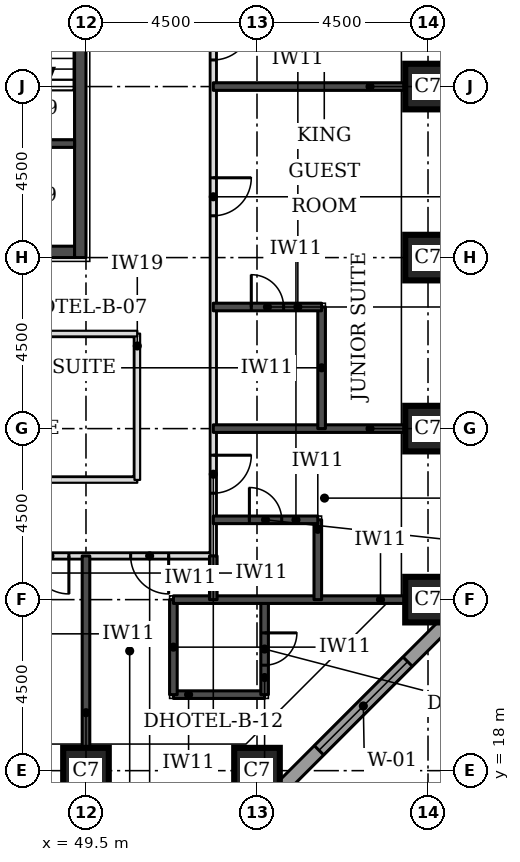
"""IFC4 building model, lengths in metres.
Left out: names, types, materials, properties, quantities, classifications, styles, units other than length and angle.
Written with IfcOpenShell. Run it as: python <this file> out.ifc"""

import sys

from ifc_helpers import new_model, si_unit, direction, frame, frame_2d, origin, origin_2d, place, context, subcontext, project, spatial, rectangle, extrude, element, fill, save


model = new_model("IFC4")
c1 = context("Model", 3, precision=1e-05, world=origin(), true_north=direction((0.0, 1.0)))
c2 = subcontext(c1, "Body", "Model", "MODEL_VIEW")
j1 = project(units=[si_unit("LENGTHUNIT", "METRE"), si_unit("PLANEANGLEUNIT", "RADIAN")], contexts=[c1])
p1 = place(None, origin())
s1 = spatial("IfcSite", under=j1, at=p1, CompositionType="ELEMENT")
p2 = place(p1, origin())
s2 = spatial("IfcBuilding", under=s1, at=p2, CompositionType="ELEMENT")
p3 = place(p2, frame((0.0, 0.0, 52.8)))
s3 = spatial("IfcBuildingStorey", under=s2, at=p3, CompositionType="ELEMENT", Elevation=52.8)
for number, where, z_axis, x_axis in (
    (1, (49.5, 18.0, 0.0), (0.0, 0.0, 1.0), (1.0, 0.0, 0.0)),
    (2, (54.0, 18.0, 0.0), (0.0, 0.0, 1.0), (1.0, 0.0, 0.0)),
    (3, (58.5, 22.5, 0.0), (0.0, 0.0, 1.0), (1.0, 0.0, 0.0)),
    (4, (58.5, 27.0, 0.0), (0.0, 0.0, 1.0), (1.0, 0.0, 0.0)),
    (5, (58.5, 31.5, 0.0), (0.0, 0.0, 1.0), (1.0, 0.0, 0.0)),
    (6, (58.5, 36.0, 0.0), (0.0, 0.0, 1.0), (1.0, 0.0, 0.0)),
):
    element("IfcColumn", number, at=place(p3, frame(where, z_axis=z_axis, x_axis=x_axis)), inside=s3, PredefinedType="COLUMN", context=c2, shape_type="SweptSolid", body=[
        extrude(rectangle(XDim=1.2, YDim=1.2, at=origin_2d()), origin(), (0.0, 0.0, 1.0), 3.3),
    ])
p4 = place(p3, frame((40.8, 31.65, 0.0), z_axis=(0.0, 0.0, 1.0), x_axis=(1.0, 0.0, 0.0)))
e7 = element("IfcWall", 7, at=p4, inside=s3, PredefinedType="SHEAR", context=c2, shape_type="SweptSolid", body=[
    extrude(rectangle(XDim=8.4, YDim=0.3, at=frame_2d((4.2, 0.0))), origin(), (0.0, 0.0, 1.0), 3.3),
])
p5 = place(p4, frame((5.2, 0.0, 0.0)))
e8 = element("IfcOpeningElement", 8, at=p5, cuts=e7, PredefinedType="OPENING", context=c2, shape_type="SweptSolid", body=[
    extrude(rectangle(XDim=1.0, YDim=2.1, at=frame_2d((0.5, 1.05))), frame((0.0, 0.16, 0.0), z_axis=(0.0, -1.0, 0.0), x_axis=(1.0, 0.0, 0.0)), (0.0, 0.0, 1.0), 0.32),
])
p6 = place(p3, frame((49.35, 31.5, 0.0), z_axis=(0.0, 0.0, 1.0), x_axis=(0.0, 1.0, 0.0)))
e9 = element("IfcWall", 9, at=p6, inside=s3, PredefinedType="SHEAR", context=c2, shape_type="SweptSolid", body=[
    extrude(rectangle(XDim=9.0, YDim=0.3, at=frame_2d((4.5, 0.0))), origin(), (0.0, 0.0, 1.0), 3.3),
])
p7 = place(p3, frame((54.27, 17.174, 0.0), z_axis=(0.0, 0.0, 1.0), x_axis=(0.707106781187, 0.707106781187, 0.0)))
e10 = element("IfcWall", 10, at=p7, inside=s3, PredefinedType="STANDARD", context=c2, shape_type="SweptSolid", body=[
    extrude(rectangle(XDim=7.151, YDim=0.35, at=frame_2d((3.576, 0.0))), origin(), (0.0, 0.0, 1.0), 3.055),
])
p8 = place(p7, frame((1.926, 0.0, 0.8)))
e11 = element("IfcOpeningElement", 11, at=p8, cuts=e10, PredefinedType="OPENING", context=c2, shape_type="SweptSolid", body=[
    extrude(rectangle(XDim=3.3, YDim=1.5, at=frame_2d((1.65, 0.75))), frame((0.0, 0.185, 0.0), z_axis=(0.0, -1.0, 0.0), x_axis=(1.0, 0.0, 0.0)), (0.0, 0.0, 1.0), 0.37),
])
p9 = place(p3, frame((20.65, 23.65, 0.0), z_axis=(0.0, 0.0, 1.0), x_axis=(1.0, 0.0, 0.0)))
e12 = element("IfcWall", 12, at=p9, inside=s3, PredefinedType="PARTITIONING", context=c2, shape_type="SweptSolid", body=[
    extrude(rectangle(XDim=32.2, YDim=0.15, at=frame_2d((16.1, 0.0))), origin(), (0.0, 0.0, 1.0), 3.08),
])
p10 = place(p9, frame((2.55, 0.0, 0.0)))
e13 = element("IfcOpeningElement", 13, at=p10, cuts=e12, PredefinedType="OPENING", context=c2, shape_type="SweptSolid", body=[
    extrude(rectangle(XDim=1.0, YDim=2.1, at=frame_2d((0.5, 1.05))), frame((0.0, 0.085, 0.0), z_axis=(0.0, -1.0, 0.0), x_axis=(1.0, 0.0, 0.0)), (0.0, 0.0, 1.0), 0.17),
])
p11 = place(p9, frame((9.4, 0.0, 0.0)))
e14 = element("IfcOpeningElement", 14, at=p11, cuts=e12, PredefinedType="OPENING", context=c2, shape_type="SweptSolid", body=[
    extrude(rectangle(XDim=1.0, YDim=2.1, at=frame_2d((0.5, 1.05))), frame((0.0, 0.085, 0.0), z_axis=(0.0, -1.0, 0.0), x_axis=(1.0, 0.0, 0.0)), (0.0, 0.0, 1.0), 0.17),
])
p12 = place(p9, frame((11.55, 0.0, 0.0)))
e15 = element("IfcOpeningElement", 15, at=p12, cuts=e12, PredefinedType="OPENING", context=c2, shape_type="SweptSolid", body=[
    extrude(rectangle(XDim=1.0, YDim=2.1, at=frame_2d((0.5, 1.05))), frame((0.0, 0.085, 0.0), z_axis=(0.0, -1.0, 0.0), x_axis=(1.0, 0.0, 0.0)), (0.0, 0.0, 1.0), 0.17),
])
p13 = place(p9, frame((18.4, 0.0, 0.0)))
e16 = element("IfcOpeningElement", 16, at=p13, cuts=e12, PredefinedType="OPENING", context=c2, shape_type="SweptSolid", body=[
    extrude(rectangle(XDim=1.0, YDim=2.1, at=frame_2d((0.5, 1.05))), frame((0.0, 0.085, 0.0), z_axis=(0.0, -1.0, 0.0), x_axis=(1.0, 0.0, 0.0)), (0.0, 0.0, 1.0), 0.17),
])
p14 = place(p9, frame((20.55, 0.0, 0.0)))
e17 = element("IfcOpeningElement", 17, at=p14, cuts=e12, PredefinedType="OPENING", context=c2, shape_type="SweptSolid", body=[
    extrude(rectangle(XDim=1.0, YDim=2.1, at=frame_2d((0.5, 1.05))), frame((0.0, 0.085, 0.0), z_axis=(0.0, -1.0, 0.0), x_axis=(1.0, 0.0, 0.0)), (0.0, 0.0, 1.0), 0.17),
])
p15 = place(p9, frame((27.4, 0.0, 0.0)))
e18 = element("IfcOpeningElement", 18, at=p15, cuts=e12, PredefinedType="OPENING", context=c2, shape_type="SweptSolid", body=[
    extrude(rectangle(XDim=1.0, YDim=2.1, at=frame_2d((0.5, 1.05))), frame((0.0, 0.085, 0.0), z_axis=(0.0, -1.0, 0.0), x_axis=(1.0, 0.0, 0.0)), (0.0, 0.0, 1.0), 0.17),
])
p16 = place(p9, frame((0.425, 0.0, 0.0)))
e19 = element("IfcOpeningElement", 19, at=p16, cuts=e12, PredefinedType="OPENING", context=c2, shape_type="SweptSolid", body=[
    extrude(rectangle(XDim=1.0, YDim=2.1, at=frame_2d((0.5, 1.05))), frame((0.0, 0.085, 0.0), z_axis=(0.0, -1.0, 0.0), x_axis=(1.0, 0.0, 0.0)), (0.0, 0.0, 1.0), 0.17),
])
p17 = place(p9, frame((30.025, 0.0, 0.0)))
e20 = element("IfcOpeningElement", 20, at=p17, cuts=e12, PredefinedType="OPENING", context=c2, shape_type="SweptSolid", body=[
    extrude(rectangle(XDim=1.0, YDim=2.1, at=frame_2d((0.5, 1.05))), frame((0.0, 0.085, 0.0), z_axis=(0.0, -1.0, 0.0), x_axis=(1.0, 0.0, 0.0)), (0.0, 0.0, 1.0), 0.17),
])
p18 = place(p3, frame((52.85, 23.65, 0.0), z_axis=(0.0, 0.0, 1.0), x_axis=(0.0, 1.0, 0.0)))
e21 = element("IfcWall", 21, at=p18, inside=s3, PredefinedType="PARTITIONING", context=c2, shape_type="SweptSolid", body=[
    extrude(rectangle(XDim=23.85, YDim=0.15, at=frame_2d((11.925, 0.0))), origin(), (0.0, 0.0, 1.0), 3.08),
])
p19 = place(p18, frame((1.65, 0.0, 0.0)))
e22 = element("IfcOpeningElement", 22, at=p19, cuts=e21, PredefinedType="OPENING", context=c2, shape_type="SweptSolid", body=[
    extrude(rectangle(XDim=1.0, YDim=2.1, at=frame_2d((0.5, 1.05))), frame((0.0, 0.085, 0.0), z_axis=(0.0, -1.0, 0.0), x_axis=(1.0, 0.0, 0.0)), (0.0, 0.0, 1.0), 0.17),
])
p20 = place(p18, frame((8.95, 0.0, 0.0)))
e23 = element("IfcOpeningElement", 23, at=p20, cuts=e21, PredefinedType="OPENING", context=c2, shape_type="SweptSolid", body=[
    extrude(rectangle(XDim=1.0, YDim=2.1, at=frame_2d((0.5, 1.05))), frame((0.0, 0.085, 0.0), z_axis=(0.0, -1.0, 0.0), x_axis=(1.0, 0.0, 0.0)), (0.0, 0.0, 1.0), 0.17),
])
p21 = place(p18, frame((13.05, 0.0, 0.0)))
e24 = element("IfcOpeningElement", 24, at=p21, cuts=e21, PredefinedType="OPENING", context=c2, shape_type="SweptSolid", body=[
    extrude(rectangle(XDim=1.0, YDim=2.1, at=frame_2d((0.5, 1.05))), frame((0.0, 0.085, 0.0), z_axis=(0.0, -1.0, 0.0), x_axis=(1.0, 0.0, 0.0)), (0.0, 0.0, 1.0), 0.17),
])
p22 = place(p18, frame((19.9, 0.0, 0.0)))
e25 = element("IfcOpeningElement", 25, at=p22, cuts=e21, PredefinedType="OPENING", context=c2, shape_type="SweptSolid", body=[
    extrude(rectangle(XDim=0.9, YDim=2.1, at=frame_2d((0.45, 1.05))), frame((0.0, 0.085, 0.0), z_axis=(0.0, -1.0, 0.0), x_axis=(1.0, 0.0, 0.0)), (0.0, 0.0, 1.0), 0.17),
])
p23 = place(p3, frame((40.5, 25.65, 0.0), z_axis=(0.0, 0.0, 1.0), x_axis=(1.0, 0.0, 0.0)))
e26 = element("IfcWall", 26, at=p23, inside=s3, PredefinedType="PARTITIONING", context=c2, shape_type="SweptSolid", body=[
    extrude(rectangle(XDim=10.35, YDim=0.15, at=frame_2d((5.175, 0.0))), origin(), (0.0, 0.0, 1.0), 3.08),
])
p24 = place(p3, frame((50.85, 25.65, 0.0), z_axis=(0.0, 0.0, 1.0), x_axis=(0.0, 1.0, 0.0)))
e27 = element("IfcWall", 27, at=p24, inside=s3, PredefinedType="PARTITIONING", context=c2, shape_type="SweptSolid", body=[
    extrude(rectangle(XDim=3.85, YDim=0.15, at=frame_2d((1.925, 0.0))), origin(), (0.0, 0.0, 1.0), 3.08),
])
p25 = place(p3, frame((40.5, 29.5, 0.0), z_axis=(0.0, 0.0, 1.0), x_axis=(1.0, 0.0, 0.0)))
e28 = element("IfcWall", 28, at=p25, inside=s3, PredefinedType="PARTITIONING", context=c2, shape_type="SweptSolid", body=[
    extrude(rectangle(XDim=10.35, YDim=0.15, at=frame_2d((5.175, 0.0))), origin(), (0.0, 0.0, 1.0), 3.08),
])
p26 = place(p25, frame((4.725, 0.0, 0.0)))
e29 = element("IfcOpeningElement", 29, at=p26, cuts=e28, PredefinedType="OPENING", context=c2, shape_type="SweptSolid", body=[
    extrude(rectangle(XDim=0.9, YDim=2.1, at=frame_2d((0.45, 1.05))), frame((0.0, 0.085, 0.0), z_axis=(0.0, -1.0, 0.0), x_axis=(1.0, 0.0, 0.0)), (0.0, 0.0, 1.0), 0.17),
])
p27 = place(p3, frame((49.5, 18.6, 0.0), z_axis=(0.0, 0.0, 1.0), x_axis=(0.0, 1.0, 0.0)))
e30 = element("IfcWall", 30, at=p27, inside=s3, PredefinedType="SOLIDWALL", context=c2, shape_type="SweptSolid", body=[
    extrude(rectangle(XDim=5.05, YDim=0.2, at=frame_2d((2.525, 0.0))), origin(), (0.0, 0.0, 1.0), 3.08),
])
p28 = place(p3, frame((51.8, 20.0, 0.0), z_axis=(0.0, 0.0, 1.0), x_axis=(1.0, 0.0, 0.0)))
e31 = element("IfcWall", 31, at=p28, inside=s3, PredefinedType="SOLIDWALL", context=c2, shape_type="SweptSolid", body=[
    extrude(rectangle(XDim=2.4, YDim=0.2, at=frame_2d((1.2, 0.0))), origin(), (0.0, 0.0, 1.0), 3.08),
])
p29 = place(p3, frame((51.8, 20.0, 0.0), z_axis=(0.0, 0.0, 1.0), x_axis=(0.0, 1.0, 0.0)))
e32 = element("IfcWall", 32, at=p29, inside=s3, PredefinedType="SOLIDWALL", context=c2, shape_type="SweptSolid", body=[
    extrude(rectangle(XDim=2.5, YDim=0.2, at=frame_2d((1.25, 0.0))), origin(), (0.0, 0.0, 1.0), 3.08),
])
p30 = place(p3, frame((54.2, 20.0, 0.0), z_axis=(0.0, 0.0, 1.0), x_axis=(0.0, 1.0, 0.0)))
e33 = element("IfcWall", 33, at=p30, inside=s3, PredefinedType="SOLIDWALL", context=c2, shape_type="SweptSolid", body=[
    extrude(rectangle(XDim=2.5, YDim=0.2, at=frame_2d((1.25, 0.0))), origin(), (0.0, 0.0, 1.0), 3.08),
])
p31 = place(p30, frame((0.775, 0.0, 0.0)))
e34 = element("IfcOpeningElement", 34, at=p31, cuts=e33, PredefinedType="OPENING", context=c2, shape_type="SweptSolid", body=[
    extrude(rectangle(XDim=0.85, YDim=2.1, at=frame_2d((0.425, 1.05))), frame((0.0, 0.11, 0.0), z_axis=(0.0, -1.0, 0.0), x_axis=(1.0, 0.0, 0.0)), (0.0, 0.0, 1.0), 0.22),
])
p32 = place(p3, frame((51.8, 22.5, 0.0), z_axis=(0.0, 0.0, 1.0), x_axis=(1.0, 0.0, 0.0)))
e35 = element("IfcWall", 35, at=p32, inside=s3, PredefinedType="SOLIDWALL", context=c2, shape_type="SweptSolid", body=[
    extrude(rectangle(XDim=6.1, YDim=0.2, at=frame_2d((3.05, 0.0))), origin(), (0.0, 0.0, 1.0), 3.08),
])
p33 = place(p3, frame((52.85, 22.5, 0.0), z_axis=(0.0, 0.0, 1.0), x_axis=(0.0, 1.0, 0.0)))
e36 = element("IfcWall", 36, at=p33, inside=s3, PredefinedType="SOLIDWALL", context=c2, shape_type="SweptSolid", body=[
    extrude(rectangle(XDim=1.15, YDim=0.2, at=frame_2d((0.575, 0.0))), origin(), (0.0, 0.0, 1.0), 3.08),
])
p34 = place(p3, frame((55.6, 22.5, 0.0), z_axis=(0.0, 0.0, 1.0), x_axis=(0.0, 1.0, 0.0)))
e37 = element("IfcWall", 37, at=p34, inside=s3, PredefinedType="SOLIDWALL", context=c2, shape_type="SweptSolid", body=[
    extrude(rectangle(XDim=2.1, YDim=0.2, at=frame_2d((1.05, 0.0))), origin(), (0.0, 0.0, 1.0), 3.08),
])
p35 = place(p3, frame((52.85, 24.6, 0.0), z_axis=(0.0, 0.0, 1.0), x_axis=(1.0, 0.0, 0.0)))
e38 = element("IfcWall", 38, at=p35, inside=s3, PredefinedType="SOLIDWALL", context=c2, shape_type="SweptSolid", body=[
    extrude(rectangle(XDim=2.75, YDim=0.2, at=frame_2d((1.375, 0.0))), origin(), (0.0, 0.0, 1.0), 3.08),
])
p36 = place(p35, frame((0.95, 0.0, 0.0)))
e39 = element("IfcOpeningElement", 39, at=p36, cuts=e38, PredefinedType="OPENING", context=c2, shape_type="SweptSolid", body=[
    extrude(rectangle(XDim=0.85, YDim=2.1, at=frame_2d((0.425, 1.05))), frame((0.0, 0.11, 0.0), z_axis=(0.0, -1.0, 0.0), x_axis=(1.0, 0.0, 0.0)), (0.0, 0.0, 1.0), 0.22),
])
p37 = place(p3, frame((52.85, 27.0, 0.0), z_axis=(0.0, 0.0, 1.0), x_axis=(1.0, 0.0, 0.0)))
e40 = element("IfcWall", 40, at=p37, inside=s3, PredefinedType="SOLIDWALL", context=c2, shape_type="SweptSolid", body=[
    extrude(rectangle(XDim=5.05, YDim=0.2, at=frame_2d((2.525, 0.0))), origin(), (0.0, 0.0, 1.0), 3.08),
])
p38 = place(p3, frame((55.7, 27.0, 0.0), z_axis=(0.0, 0.0, 1.0), x_axis=(0.0, 1.0, 0.0)))
e41 = element("IfcWall", 41, at=p38, inside=s3, PredefinedType="SOLIDWALL", context=c2, shape_type="SweptSolid", body=[
    extrude(rectangle(XDim=3.2, YDim=0.2, at=frame_2d((1.6, 0.0))), origin(), (0.0, 0.0, 1.0), 3.08),
])
p39 = place(p3, frame((52.85, 30.2, 0.0), z_axis=(0.0, 0.0, 1.0), x_axis=(1.0, 0.0, 0.0)))
e42 = element("IfcWall", 42, at=p39, inside=s3, PredefinedType="SOLIDWALL", context=c2, shape_type="SweptSolid", body=[
    extrude(rectangle(XDim=2.85, YDim=0.2, at=frame_2d((1.425, 0.0))), origin(), (0.0, 0.0, 1.0), 3.08),
])
p40 = place(p39, frame((1.0, 0.0, 0.0)))
e43 = element("IfcOpeningElement", 43, at=p40, cuts=e42, PredefinedType="OPENING", context=c2, shape_type="SweptSolid", body=[
    extrude(rectangle(XDim=0.85, YDim=2.1, at=frame_2d((0.425, 1.05))), frame((0.0, 0.11, 0.0), z_axis=(0.0, -1.0, 0.0), x_axis=(1.0, 0.0, 0.0)), (0.0, 0.0, 1.0), 0.22),
])
p41 = place(p3, frame((52.85, 36.0, 0.0), z_axis=(0.0, 0.0, 1.0), x_axis=(1.0, 0.0, 0.0)))
e44 = element("IfcWall", 44, at=p41, inside=s3, PredefinedType="SOLIDWALL", context=c2, shape_type="SweptSolid", body=[
    extrude(rectangle(XDim=5.05, YDim=0.2, at=frame_2d((2.525, 0.0))), origin(), (0.0, 0.0, 1.0), 3.08),
])
p42 = place(p3, frame((46.2, 34.5, 0.0), z_axis=(0.0, 0.0, 1.0), x_axis=(1.0, 0.0, 0.0)))
e45 = element("IfcWall", 45, at=p42, inside=s3, PredefinedType="SOLIDWALL", context=c2, shape_type="SweptSolid", body=[
    extrude(rectangle(XDim=3.0, YDim=0.2, at=frame_2d((1.5, 0.0))), origin(), (0.0, 0.0, 1.0), 3.08),
])
p43 = place(p8, origin())
e46 = element("IfcWindow", 46, at=p43, inside=s3, PartitioningType="SINGLE_PANEL", PredefinedType="WINDOW", context=c2, shape_type="SweptSolid", body=[
    extrude(rectangle(XDim=3.3, YDim=1.5, at=frame_2d((1.65, 0.75))), frame((0.0, 0.085, 0.0), z_axis=(0.0, -1.0, 0.0), x_axis=(1.0, 0.0, 0.0)), (0.0, 0.0, 1.0), 0.06),
])
fill(e11, e46)
p44 = place(p15, frame((1.0, 0.0, 0.0), z_axis=(0.0, 0.0, 1.0), x_axis=(-1.0, 0.0, 0.0)))
e47 = element("IfcDoor", 47, at=p44, inside=s3, OperationType="SINGLE_SWING_LEFT", PredefinedType="DOOR", context=c2, shape_type="SweptSolid", body=[
    extrude(rectangle(XDim=1.0, YDim=2.1, at=frame_2d((0.5, 1.05))), frame((0.0, 0.025, 0.0), z_axis=(0.0, -1.0, 0.0), x_axis=(1.0, 0.0, 0.0)), (0.0, 0.0, 1.0), 0.05),
])
fill(e18, e47)
p45 = place(p19, frame((1.0, 0.0, 0.0), z_axis=(0.0, 0.0, 1.0), x_axis=(-1.0, 0.0, 0.0)))
e48 = element("IfcDoor", 48, at=p45, inside=s3, OperationType="SINGLE_SWING_LEFT", PredefinedType="DOOR", context=c2, shape_type="SweptSolid", body=[
    extrude(rectangle(XDim=1.0, YDim=2.1, at=frame_2d((0.5, 1.05))), frame((0.0, 0.025, 0.0), z_axis=(0.0, -1.0, 0.0), x_axis=(1.0, 0.0, 0.0)), (0.0, 0.0, 1.0), 0.05),
])
fill(e22, e48)
p46 = place(p36, origin())
e49 = element("IfcDoor", 49, at=p46, inside=s3, OperationType="SINGLE_SWING_LEFT", PredefinedType="DOOR", context=c2, shape_type="SweptSolid", body=[
    extrude(rectangle(XDim=0.85, YDim=2.1, at=frame_2d((0.425, 1.05))), frame((0.0, 0.025, 0.0), z_axis=(0.0, -1.0, 0.0), x_axis=(1.0, 0.0, 0.0)), (0.0, 0.0, 1.0), 0.05),
])
fill(e39, e49)
p47 = place(p20, frame((1.0, 0.0, 0.0), z_axis=(0.0, 0.0, 1.0), x_axis=(-1.0, 0.0, 0.0)))
e50 = element("IfcDoor", 50, at=p47, inside=s3, OperationType="SINGLE_SWING_LEFT", PredefinedType="DOOR", context=c2, shape_type="SweptSolid", body=[
    extrude(rectangle(XDim=1.0, YDim=2.1, at=frame_2d((0.5, 1.05))), frame((0.0, 0.025, 0.0), z_axis=(0.0, -1.0, 0.0), x_axis=(1.0, 0.0, 0.0)), (0.0, 0.0, 1.0), 0.05),
])
fill(e23, e50)
p48 = place(p40, origin())
e51 = element("IfcDoor", 51, at=p48, inside=s3, OperationType="SINGLE_SWING_LEFT", PredefinedType="DOOR", context=c2, shape_type="SweptSolid", body=[
    extrude(rectangle(XDim=0.85, YDim=2.1, at=frame_2d((0.425, 1.05))), frame((0.0, 0.025, 0.0), z_axis=(0.0, -1.0, 0.0), x_axis=(1.0, 0.0, 0.0)), (0.0, 0.0, 1.0), 0.05),
])
fill(e43, e51)
p49 = place(p21, frame((1.0, 0.0, 0.0), z_axis=(0.0, 0.0, 1.0), x_axis=(-1.0, 0.0, 0.0)))
e52 = element("IfcDoor", 52, at=p49, inside=s3, OperationType="SINGLE_SWING_LEFT", PredefinedType="DOOR", context=c2, shape_type="SweptSolid", body=[
    extrude(rectangle(XDim=1.0, YDim=2.1, at=frame_2d((0.5, 1.05))), frame((0.0, 0.025, 0.0), z_axis=(0.0, -1.0, 0.0), x_axis=(1.0, 0.0, 0.0)), (0.0, 0.0, 1.0), 0.05),
])
fill(e24, e52)
p50 = place(p17, frame((1.0, 0.0, 0.0), z_axis=(0.0, 0.0, 1.0), x_axis=(-1.0, 0.0, 0.0)))
e53 = element("IfcDoor", 53, at=p50, inside=s3, OperationType="SINGLE_SWING_LEFT", PredefinedType="DOOR", context=c2, shape_type="SweptSolid", body=[
    extrude(rectangle(XDim=1.0, YDim=2.1, at=frame_2d((0.5, 1.05))), frame((0.0, 0.025, 0.0), z_axis=(0.0, -1.0, 0.0), x_axis=(1.0, 0.0, 0.0)), (0.0, 0.0, 1.0), 0.05),
])
fill(e20, e53)
p51 = place(p31, frame((0.85, 0.0, 0.0), z_axis=(0.0, 0.0, 1.0), x_axis=(-1.0, 0.0, 0.0)))
e54 = element("IfcDoor", 54, at=p51, inside=s3, OperationType="SINGLE_SWING_LEFT", PredefinedType="DOOR", context=c2, shape_type="SweptSolid", body=[
    extrude(rectangle(XDim=0.85, YDim=2.1, at=frame_2d((0.425, 1.05))), frame((0.0, 0.025, 0.0), z_axis=(0.0, -1.0, 0.0), x_axis=(1.0, 0.0, 0.0)), (0.0, 0.0, 1.0), 0.05),
])
fill(e34, e54)
save(model, sys.argv[1])
